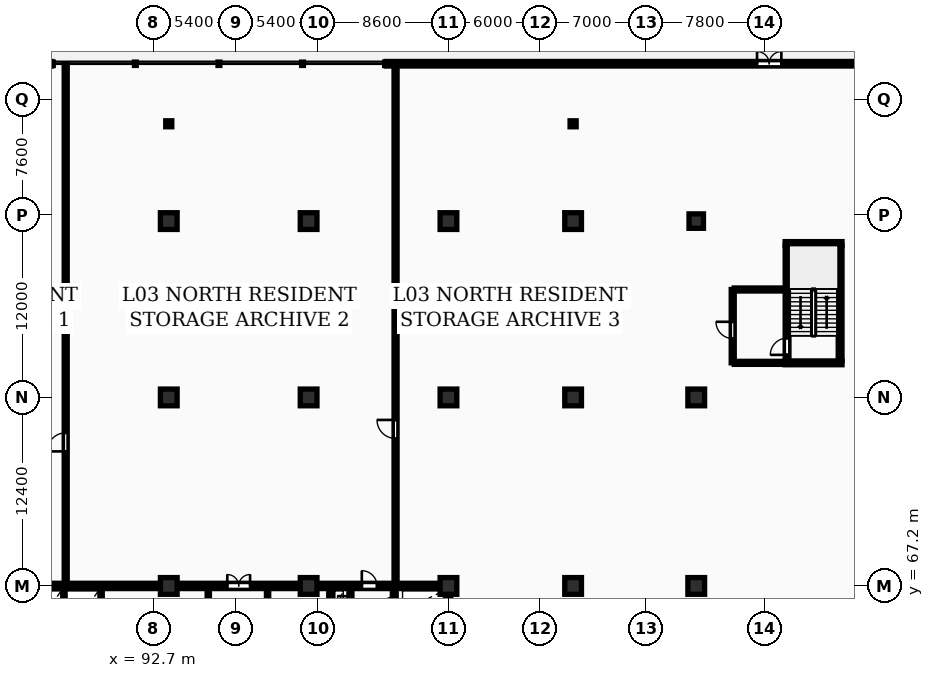
"""IFC4 building model, lengths in metres.
Left out: names, types, materials, properties, quantities, classifications, styles, units other than length and angle.
Written with IfcOpenShell. Run it as: python <this file> out.ifc"""

import sys

from ifc_helpers import new_model, si_unit, direction, frame, frame_2d, origin, origin_2d, place, context, subcontext, project, spatial, rectangle, circle, i_section, extrude, element, fill, save


model = new_model("IFC4")
c1 = context("Model", 3, precision=1e-05, world=origin(), true_north=direction((0.0, 1.0)))
c2 = subcontext(c1, "Body", "Model", "MODEL_VIEW")
j1 = project(units=[si_unit("LENGTHUNIT", "METRE"), si_unit("PLANEANGLEUNIT", "RADIAN")], contexts=[c1])
p1 = place(None, origin())
s1 = spatial("IfcSite", under=j1, at=p1, CompositionType="ELEMENT")
p2 = place(p1, origin())
s2 = spatial("IfcBuilding", under=s1, at=p2, CompositionType="ELEMENT")
p3 = place(p2, frame((0.0, 0.0, 14.5)))
s3 = spatial("IfcBuildingStorey", under=s2, at=p3, CompositionType="ELEMENT", Elevation=14.5)
for number, where, z_axis, x_axis in (
    (1, (93.7, 67.2, 0.0), (0.0, 0.0, 1.0), (1.0, 0.0, 0.0)),
    (2, (93.7, 79.6, 0.0), (0.0, 0.0, 1.0), (1.0, 0.0, 0.0)),
    (3, (93.7, 91.2, 0.0), (0.0, 0.0, 1.0), (1.0, 0.0, 0.0)),
    (4, (102.9, 67.2, 0.0), (0.0, 0.0, 1.0), (1.0, 0.0, 0.0)),
    (5, (102.9, 79.6, 0.0), (0.0, 0.0, 1.0), (1.0, 0.0, 0.0)),
    (6, (102.9, 91.2, 0.0), (0.0, 0.0, 1.0), (1.0, 0.0, 0.0)),
    (7, (112.1, 67.2, 0.0), (0.0, 0.0, 1.0), (1.0, 0.0, 0.0)),
    (8, (112.1, 79.6, 0.0), (0.0, 0.0, 1.0), (1.0, 0.0, 0.0)),
    (9, (112.1, 91.2, 0.0), (0.0, 0.0, 1.0), (1.0, 0.0, 0.0)),
    (10, (120.3, 67.2, 0.0), (0.0, 0.0, 1.0), (1.0, 0.0, 0.0)),
    (11, (120.3, 79.6, 0.0), (0.0, 0.0, 1.0), (1.0, 0.0, 0.0)),
    (12, (120.3, 91.2, 0.0), (0.0, 0.0, 1.0), (1.0, 0.0, 0.0)),
    (13, (128.4, 67.2, 0.0), (0.0, 0.0, 1.0), (1.0, 0.0, 0.0)),
    (14, (128.4, 79.6, 0.0), (0.0, 0.0, 1.0), (1.0, 0.0, 0.0)),
):
    element("IfcColumn", number, at=place(p3, frame(where, z_axis=z_axis, x_axis=x_axis)), inside=s3, PredefinedType="COLUMN", context=c2, shape_type="SweptSolid", body=[
        extrude(rectangle(XDim=1.1, YDim=1.1, at=origin_2d()), origin(), (0.0, 0.0, 1.0), 4.5),
    ])
p4 = place(p3, frame((128.4, 91.2, 0.0), z_axis=(0.0, 0.0, 1.0), x_axis=(1.0, 0.0, 0.0)))
e15 = element("IfcColumn", 15, at=p4, inside=s3, PredefinedType="COLUMN", context=c2, shape_type="SweptSolid", body=[
    extrude(circle(Radius=0.475, at=origin_2d()), origin(), (0.0, 0.0, 1.0), 4.5),
])
for number, where, z_axis, x_axis in (
    (16, (93.7, 97.6, 0.0), (0.0, 0.0, 1.0), (1.0, 0.0, 0.0)),
    (17, (120.3, 97.6, 0.0), (0.0, 0.0, 1.0), (1.0, 0.0, 0.0)),
):
    element("IfcColumn", number, at=place(p3, frame(where, z_axis=z_axis, x_axis=x_axis)), inside=s3, PredefinedType="COLUMN", context=c2, shape_type="SweptSolid", body=[
        extrude(i_section(OverallWidth=0.399, OverallDepth=0.394, WebThickness=0.023, FlangeThickness=0.037, FilletRadius=0.015, at=origin_2d()), origin(), (0.0, 0.0, 1.0), 4.5),
    ])
p5 = place(p3, frame((144.0, 101.55, 0.0), z_axis=(0.0, 0.0, 1.0), x_axis=(-1.0, 0.0, 0.0)))
e18 = element("IfcWall", 18, at=p5, inside=s3, PredefinedType="STANDARD", context=c2, shape_type="SweptSolid", body=[
    extrude(rectangle(XDim=36.0, YDim=0.3, at=frame_2d((18.0, 0.0))), origin(), (0.0, 0.0, 1.0), 4.18),
])
p6 = place(p5, frame((10.0, 0.0, 0.0)))
e19 = element("IfcOpeningElement", 19, at=p6, cuts=e18, PredefinedType="OPENING", context=c2, shape_type="SweptSolid", body=[
    extrude(rectangle(XDim=1.6, YDim=2.2, at=frame_2d((0.8, 1.1))), frame((0.0, 0.16, 0.0), z_axis=(0.0, -1.0, 0.0), x_axis=(1.0, 0.0, 0.0)), (0.0, 0.0, 1.0), 0.32),
])
p7 = place(p3, frame((112.075, 55.375, 0.0), z_axis=(0.0, 0.0, 1.0), x_axis=(0.0, 1.0, 0.0)))
e20 = element("IfcWall", 20, at=p7, inside=s3, PredefinedType="SHEAR", context=c2, shape_type="SweptSolid", body=[
    extrude(rectangle(XDim=11.65, YDim=0.35, at=frame_2d((5.825, 0.0))), origin(), (0.0, 0.0, 1.0), 4.5),
])
p8 = place(p3, frame((75.95, 67.2, 0.0), z_axis=(0.0, 0.0, 1.0), x_axis=(1.0, 0.0, 0.0)))
e21 = element("IfcWall", 21, at=p8, inside=s3, PredefinedType="SHEAR", context=c2, shape_type="SweptSolid", body=[
    extrude(rectangle(XDim=36.3, YDim=0.35, at=frame_2d((18.15, 0.0))), origin(), (0.0, 0.0, 1.0), 4.5),
])
p9 = place(p8, frame((5.25, 0.0, 0.0)))
e22 = element("IfcOpeningElement", 22, at=p9, cuts=e21, PredefinedType="OPENING", context=c2, shape_type="SweptSolid", body=[
    extrude(rectangle(XDim=1.0, YDim=2.15, at=frame_2d((0.5, 1.075))), frame((0.0, 0.185, 0.0), z_axis=(0.0, -1.0, 0.0), x_axis=(1.0, 0.0, 0.0)), (0.0, 0.0, 1.0), 0.37),
])
p10 = place(p8, frame((21.6, 0.0, 0.0)))
e23 = element("IfcOpeningElement", 23, at=p10, cuts=e21, PredefinedType="OPENING", context=c2, shape_type="SweptSolid", body=[
    extrude(rectangle(XDim=1.5, YDim=2.2, at=frame_2d((0.75, 1.1))), frame((0.0, 0.185, 0.0), z_axis=(0.0, -1.0, 0.0), x_axis=(1.0, 0.0, 0.0)), (0.0, 0.0, 1.0), 0.37),
])
p11 = place(p8, frame((30.45, 0.0, 0.0)))
e24 = element("IfcOpeningElement", 24, at=p11, cuts=e21, PredefinedType="OPENING", context=c2, shape_type="SweptSolid", body=[
    extrude(rectangle(XDim=1.0, YDim=2.15, at=frame_2d((0.5, 1.075))), frame((0.0, 0.185, 0.0), z_axis=(0.0, -1.0, 0.0), x_axis=(1.0, 0.0, 0.0)), (0.0, 0.0, 1.0), 0.37),
])
for number, where, z_axis, x_axis in (
    (25, (86.8, 63.4, 0.0), (0.0, 0.0, 1.0), (0.0, 1.0, 0.0)),
    (26, (89.25, 63.4, 0.0), (0.0, 0.0, 1.0), (0.0, 1.0, 0.0)),
    (27, (96.3, 63.4, 0.0), (0.0, 0.0, 1.0), (0.0, 1.0, 0.0)),
    (28, (100.2, 63.4, 0.0), (0.0, 0.0, 1.0), (0.0, 1.0, 0.0)),
):
    element("IfcWall", number, at=place(p3, frame(where, z_axis=z_axis, x_axis=x_axis)), inside=s3, PredefinedType="PARTITIONING", context=c2, shape_type="SweptSolid", body=[
        extrude(rectangle(XDim=3.6, YDim=0.15, at=frame_2d((1.8, 0.0))), origin(), (0.0, 0.0, 1.0), 4.18),
    ])
p12 = place(p3, frame((105.65, 65.28, 0.0), z_axis=(0.0, 0.0, 1.0), x_axis=(0.0, 1.0, 0.0)))
e29 = element("IfcWall", 29, at=p12, inside=s3, PredefinedType="PARTITIONING", context=c2, shape_type="SweptSolid", body=[
    extrude(rectangle(XDim=1.72, YDim=0.2, at=frame_2d((0.86, 0.0))), origin(), (0.0, 0.0, 1.0), 4.18),
])
p13 = place(p12, frame((0.4, 0.0, 0.0)))
e30 = element("IfcOpeningElement", 30, at=p13, cuts=e29, PredefinedType="OPENING", context=c2, shape_type="SweptSolid", body=[
    extrude(rectangle(XDim=0.85, YDim=2.05, at=frame_2d((0.425, 1.025))), frame((0.0, 0.11, 0.0), z_axis=(0.0, -1.0, 0.0), x_axis=(1.0, 0.0, 0.0)), (0.0, 0.0, 1.0), 0.22),
])
p14 = place(p3, frame((104.35, 58.4, 0.0), z_axis=(0.0, 0.0, 1.0), x_axis=(0.0, 1.0, 0.0)))
e31 = element("IfcWall", 31, at=p14, inside=s3, PredefinedType="SHEAR", context=c2, shape_type="SweptSolid", body=[
    extrude(rectangle(XDim=8.6, YDim=0.25, at=frame_2d((4.3, 0.0))), origin(), (0.0, 0.0, 1.0), 4.5),
])
p15 = place(p14, frame((1.8, 0.0, 0.0)))
e32 = element("IfcOpeningElement", 32, at=p15, cuts=e31, PredefinedType="OPENING", context=c2, shape_type="SweptSolid", body=[
    extrude(rectangle(XDim=1.1, YDim=2.1, at=frame_2d((0.55, 1.05))), frame((0.0, 0.135, 0.0), z_axis=(0.0, -1.0, 0.0), x_axis=(1.0, 0.0, 0.0)), (0.0, 0.0, 1.0), 0.27),
])
p16 = place(p3, frame((108.535, 55.4, 0.0), z_axis=(0.0, 0.0, 1.0), x_axis=(0.0, 1.0, 0.0)))
e33 = element("IfcWall", 33, at=p16, inside=s3, PredefinedType="SHEAR", context=c2, shape_type="SweptSolid", body=[
    extrude(rectangle(XDim=11.6, YDim=0.25, at=frame_2d((5.8, 0.0))), origin(), (0.0, 0.0, 1.0), 4.5),
])
p17 = place(p16, frame((8.2, 0.0, 0.0)))
e34 = element("IfcOpeningElement", 34, at=p17, cuts=e33, PredefinedType="OPENING", context=c2, shape_type="SweptSolid", body=[
    extrude(rectangle(XDim=1.1, YDim=2.1, at=frame_2d((0.55, 1.05))), frame((0.0, 0.135, 0.0), z_axis=(0.0, -1.0, 0.0), x_axis=(1.0, 0.0, 0.0)), (0.0, 0.0, 1.0), 0.27),
])
p18 = place(p16, frame((10.25, 0.0, 0.0)))
e35 = element("IfcOpeningElement", 35, at=p18, cuts=e33, PredefinedType="OPENING", context=c2, shape_type="SweptSolid", body=[
    extrude(rectangle(XDim=0.85, YDim=2.05, at=frame_2d((0.425, 1.025))), frame((0.0, 0.135, 0.0), z_axis=(0.0, -1.0, 0.0), x_axis=(1.0, 0.0, 0.0)), (0.0, 0.0, 1.0), 0.27),
])
p19 = place(p3, frame((134.375, 82.0, 0.0), z_axis=(0.0, 0.0, 1.0), x_axis=(0.0, 1.0, 0.0)))
e36 = element("IfcWall", 36, at=p19, inside=s3, PredefinedType="SHEAR", context=c2, shape_type="SweptSolid", body=[
    extrude(rectangle(XDim=7.6, YDim=0.25, at=frame_2d((3.8, 0.0))), origin(), (0.0, 0.0, 1.0), 4.5),
])
p20 = place(p19, frame((0.4, 0.0, 0.0)))
e37 = element("IfcOpeningElement", 37, at=p20, cuts=e36, PredefinedType="OPENING", context=c2, shape_type="SweptSolid", body=[
    extrude(rectangle(XDim=1.1, YDim=2.1, at=frame_2d((0.55, 1.05))), frame((0.0, 0.135, 0.0), z_axis=(0.0, -1.0, 0.0), x_axis=(1.0, 0.0, 0.0)), (0.0, 0.0, 1.0), 0.27),
])
p21 = place(p3, frame((137.865, 82.0, 0.0), z_axis=(0.0, 0.0, 1.0), x_axis=(0.0, 1.0, 0.0)))
e38 = element("IfcWall", 38, at=p21, inside=s3, PredefinedType="SHEAR", context=c2, shape_type="SweptSolid", body=[
    extrude(rectangle(XDim=7.6, YDim=0.25, at=frame_2d((3.8, 0.0))), origin(), (0.0, 0.0, 1.0), 4.5),
])
for number, where, z_axis, x_axis in (
    (39, (134.25, 81.875, 0.0), (0.0, 0.0, 1.0), (1.0, 0.0, 0.0)),
    (40, (134.25, 89.725, 0.0), (0.0, 0.0, 1.0), (1.0, 0.0, 0.0)),
):
    element("IfcWall", number, at=place(p3, frame(where, z_axis=z_axis, x_axis=x_axis)), inside=s3, PredefinedType="SHEAR", context=c2, shape_type="SweptSolid", body=[
        extrude(rectangle(XDim=3.74, YDim=0.25, at=frame_2d((1.87, 0.0))), origin(), (0.0, 0.0, 1.0), 4.5),
    ])
p22 = place(p3, frame((130.8, 81.875, 0.0), z_axis=(0.0, 0.0, 1.0), x_axis=(0.0, 1.0, 0.0)))
e41 = element("IfcWall", 41, at=p22, inside=s3, PredefinedType="PARTITIONING", context=c2, shape_type="SweptSolid", body=[
    extrude(rectangle(XDim=4.825, YDim=0.2, at=frame_2d((2.413, 0.0))), origin(), (0.0, 0.0, 1.0), 4.18),
])
p23 = place(p22, frame((1.6, 0.0, 0.0)))
e42 = element("IfcOpeningElement", 42, at=p23, cuts=e41, PredefinedType="OPENING", context=c2, shape_type="SweptSolid", body=[
    extrude(rectangle(XDim=1.1, YDim=2.15, at=frame_2d((0.55, 1.075))), frame((0.0, 0.11, 0.0), z_axis=(0.0, -1.0, 0.0), x_axis=(1.0, 0.0, 0.0)), (0.0, 0.0, 1.0), 0.22),
])
for number, where, z_axis, x_axis in (
    (43, (130.9, 81.875, 0.0), (0.0, 0.0, 1.0), (1.0, 0.0, 0.0)),
    (44, (130.9, 86.7, 0.0), (0.0, 0.0, 1.0), (1.0, 0.0, 0.0)),
):
    element("IfcWall", number, at=place(p3, frame(where, z_axis=z_axis, x_axis=x_axis)), inside=s3, PredefinedType="PARTITIONING", context=c2, shape_type="SweptSolid", body=[
        extrude(rectangle(XDim=3.35, YDim=0.2, at=frame_2d((1.675, 0.0))), origin(), (0.0, 0.0, 1.0), 4.18),
    ])
p24 = place(p3, frame((86.92, 67.4, 0.0), z_axis=(0.0, 0.0, 1.0), x_axis=(0.0, 1.0, 0.0)))
e45 = element("IfcWall", 45, at=p24, inside=s3, PredefinedType="PARTITIONING", context=c2, shape_type="SweptSolid", body=[
    extrude(rectangle(XDim=34.12, YDim=0.2, at=frame_2d((17.06, 0.0))), origin(), (0.0, 0.0, 1.0), 4.18),
])
p25 = place(p24, frame((8.65, 0.0, 0.0)))
e46 = element("IfcOpeningElement", 46, at=p25, cuts=e45, PredefinedType="OPENING", context=c2, shape_type="SweptSolid", body=[
    extrude(rectangle(XDim=1.22, YDim=2.18, at=frame_2d((0.61, 1.09))), frame((0.0, 0.11, 0.0), z_axis=(0.0, -1.0, 0.0), x_axis=(1.0, 0.0, 0.0)), (0.0, 0.0, 1.0), 0.22),
])
p26 = place(p3, frame((108.62, 67.4, 0.0), z_axis=(0.0, 0.0, 1.0), x_axis=(0.0, 1.0, 0.0)))
e47 = element("IfcWall", 47, at=p26, inside=s3, PredefinedType="PARTITIONING", context=c2, shape_type="SweptSolid", body=[
    extrude(rectangle(XDim=34.12, YDim=0.2, at=frame_2d((17.06, 0.0))), origin(), (0.0, 0.0, 1.0), 4.18),
])
p27 = place(p26, frame((9.5, 0.0, 0.0)))
e48 = element("IfcOpeningElement", 48, at=p27, cuts=e47, PredefinedType="OPENING", context=c2, shape_type="SweptSolid", body=[
    extrude(rectangle(XDim=1.22, YDim=2.18, at=frame_2d((0.61, 1.09))), frame((0.0, 0.11, 0.0), z_axis=(0.0, -1.0, 0.0), x_axis=(1.0, 0.0, 0.0)), (0.0, 0.0, 1.0), 0.22),
])
p28 = place(p6, frame((1.6, 0.0, 0.0), z_axis=(0.0, 0.0, 1.0), x_axis=(-1.0, 0.0, 0.0)))
e49 = element("IfcDoor", 49, at=p28, inside=s3, OperationType="DOUBLE_DOOR_SINGLE_SWING", PredefinedType="DOOR", context=c2, shape_type="SweptSolid", body=[
    extrude(rectangle(XDim=1.6, YDim=2.2, at=frame_2d((0.8, 1.1))), frame((0.0, 0.025, 0.0), z_axis=(0.0, -1.0, 0.0), x_axis=(1.0, 0.0, 0.0)), (0.0, 0.0, 1.0), 0.05),
])
fill(e19, e49)
p29 = place(p10, origin())
e50 = element("IfcDoor", 50, at=p29, inside=s3, OperationType="DOUBLE_DOOR_SINGLE_SWING", PredefinedType="DOOR", context=c2, shape_type="SweptSolid", body=[
    extrude(rectangle(XDim=1.5, YDim=2.2, at=frame_2d((0.75, 1.1))), frame((0.0, 0.025, 0.0), z_axis=(0.0, -1.0, 0.0), x_axis=(1.0, 0.0, 0.0)), (0.0, 0.0, 1.0), 0.05),
])
fill(e23, e50)
p30 = place(p11, origin())
e51 = element("IfcDoor", 51, at=p30, inside=s3, OperationType="SINGLE_SWING_LEFT", PredefinedType="DOOR", context=c2, shape_type="SweptSolid", body=[
    extrude(rectangle(XDim=1.0, YDim=2.15, at=frame_2d((0.5, 1.075))), frame((0.0, 0.025, 0.0), z_axis=(0.0, -1.0, 0.0), x_axis=(1.0, 0.0, 0.0)), (0.0, 0.0, 1.0), 0.05),
])
fill(e24, e51)
p31 = place(p13, origin())
e52 = element("IfcDoor", 52, at=p31, inside=s3, OperationType="SINGLE_SWING_RIGHT", PredefinedType="DOOR", context=c2, shape_type="SweptSolid", body=[
    extrude(rectangle(XDim=0.85, YDim=2.05, at=frame_2d((0.425, 1.025))), frame((0.0, 0.025, 0.0), z_axis=(0.0, -1.0, 0.0), x_axis=(1.0, 0.0, 0.0)), (0.0, 0.0, 1.0), 0.05),
])
fill(e30, e52)
p32 = place(p18, origin())
e53 = element("IfcDoor", 53, at=p32, inside=s3, OperationType="SINGLE_SWING_LEFT", PredefinedType="DOOR", context=c2, shape_type="SweptSolid", body=[
    extrude(rectangle(XDim=0.85, YDim=2.05, at=frame_2d((0.425, 1.025))), frame((0.0, 0.025, 0.0), z_axis=(0.0, -1.0, 0.0), x_axis=(1.0, 0.0, 0.0)), (0.0, 0.0, 1.0), 0.05),
])
fill(e35, e53)
p33 = place(p20, origin())
e54 = element("IfcDoor", 54, at=p33, inside=s3, OperationType="SINGLE_SWING_LEFT", PredefinedType="DOOR", context=c2, shape_type="SweptSolid", body=[
    extrude(rectangle(XDim=1.1, YDim=2.1, at=frame_2d((0.55, 1.05))), frame((0.0, 0.025, 0.0), z_axis=(0.0, -1.0, 0.0), x_axis=(1.0, 0.0, 0.0)), (0.0, 0.0, 1.0), 0.05),
])
fill(e37, e54)
p34 = place(p23, origin())
e55 = element("IfcDoor", 55, at=p34, inside=s3, OperationType="SINGLE_SWING_RIGHT", PredefinedType="DOOR", context=c2, shape_type="SweptSolid", body=[
    extrude(rectangle(XDim=1.1, YDim=2.15, at=frame_2d((0.55, 1.075))), frame((0.0, 0.025, 0.0), z_axis=(0.0, -1.0, 0.0), x_axis=(1.0, 0.0, 0.0)), (0.0, 0.0, 1.0), 0.05),
])
fill(e42, e55)
p35 = place(p25, origin())
e56 = element("IfcDoor", 56, at=p35, inside=s3, OperationType="SINGLE_SWING_LEFT", PredefinedType="DOOR", context=c2, shape_type="SweptSolid", body=[
    extrude(rectangle(XDim=1.22, YDim=2.18, at=frame_2d((0.61, 1.09))), frame((0.0, 0.025, 0.0), z_axis=(0.0, -1.0, 0.0), x_axis=(1.0, 0.0, 0.0)), (0.0, 0.0, 1.0), 0.05),
])
fill(e46, e56)
p36 = place(p27, origin())
e57 = element("IfcDoor", 57, at=p36, inside=s3, OperationType="SINGLE_SWING_RIGHT", PredefinedType="DOOR", context=c2, shape_type="SweptSolid", body=[
    extrude(rectangle(XDim=1.22, YDim=2.18, at=frame_2d((0.61, 1.09))), frame((0.0, 0.025, 0.0), z_axis=(0.0, -1.0, 0.0), x_axis=(1.0, 0.0, 0.0)), (0.0, 0.0, 1.0), 0.05),
])
fill(e48, e57)
save(model, sys.argv[1])
